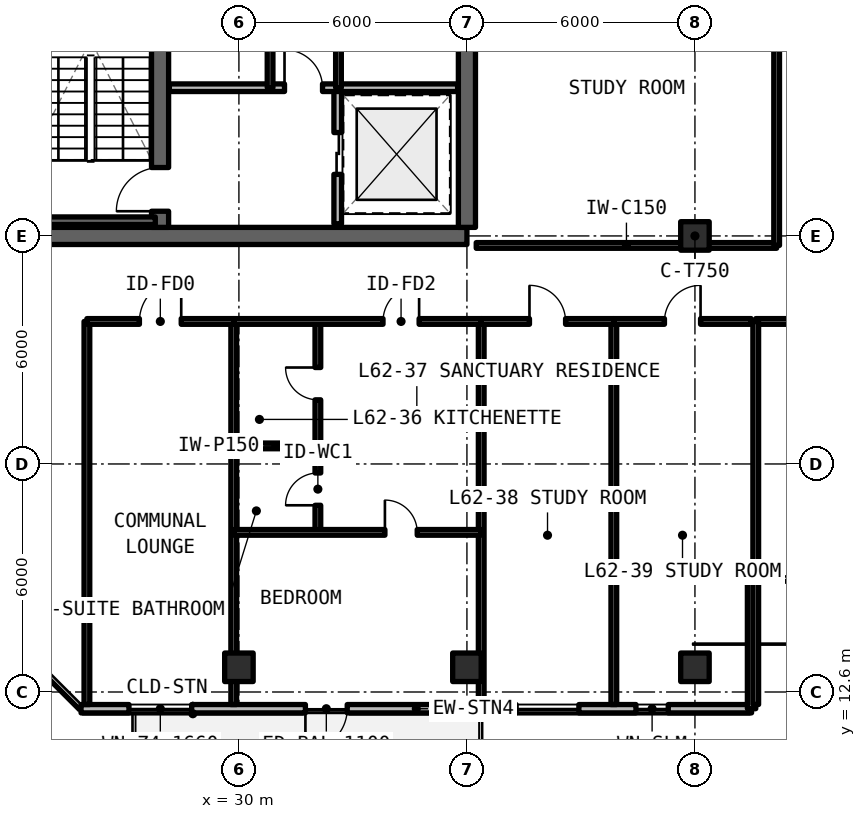
"""IFC4 building model, lengths in metres.
Left out: names, types, materials, properties, quantities, classifications, styles, units other than length and angle.
Written with IfcOpenShell. Run it as: python <this file> out.ifc"""

import sys

from ifc_helpers import new_model, si_unit, direction, frame, frame_2d, origin, origin_2d, place, context, subcontext, project, spatial, rectangle, extrude, element, fill, save


model = new_model("IFC4")
c1 = context("Model", 3, precision=1e-05, world=origin(), true_north=direction((0.0, 1.0)))
c2 = subcontext(c1, "Body", "Model", "MODEL_VIEW")
j1 = project(units=[si_unit("LENGTHUNIT", "METRE"), si_unit("PLANEANGLEUNIT", "RADIAN")], contexts=[c1])
p1 = place(None, origin())
s1 = spatial("IfcSite", under=j1, at=p1, CompositionType="ELEMENT")
p2 = place(p1, origin())
s2 = spatial("IfcBuilding", under=s1, at=p2, CompositionType="ELEMENT")
p3 = place(p2, frame((0.0, 0.0, 222.75)))
s3 = spatial("IfcBuildingStorey", under=s2, at=p3, CompositionType="ELEMENT", Elevation=222.75)
p4 = place(p3, frame((24.0, 24.6, 0.0), z_axis=(0.0, 0.0, 1.0), x_axis=(1.0, 0.0, 0.0)))
e1 = element("IfcWall", 1, at=p4, inside=s3, PredefinedType="SHEAR", context=c2, shape_type="SweptSolid", body=[
    extrude(rectangle(XDim=12.0, YDim=0.45, at=frame_2d((6.0, 0.0))), origin(), (0.0, 0.0, 1.0), 3.3),
])
p5 = place(p3, frame((36.0, 24.825, 0.0), z_axis=(0.0, 0.0, 1.0), x_axis=(0.0, 1.0, 0.0)))
e2 = element("IfcWall", 2, at=p5, inside=s3, PredefinedType="SHEAR", context=c2, shape_type="SweptSolid", body=[
    extrude(rectangle(XDim=8.975, YDim=0.45, at=frame_2d((4.488, 0.0))), origin(), (0.0, 0.0, 1.0), 3.3),
])
p6 = place(p3, frame((27.925, 24.825, 0.0), z_axis=(0.0, 0.0, 1.0), x_axis=(0.0, 1.0, 0.0)))
e3 = element("IfcWall", 3, at=p6, inside=s3, PredefinedType="SHEAR", context=c2, shape_type="SweptSolid", body=[
    extrude(rectangle(XDim=17.55, YDim=0.45, at=frame_2d((8.775, 0.0))), origin(), (0.0, 0.0, 1.0), 3.3),
])
p7 = place(p6, frame((0.425, 0.0, 0.0)))
e4 = element("IfcOpeningElement", 4, at=p7, cuts=e3, PredefinedType="OPENING", context=c2, shape_type="SweptSolid", body=[
    extrude(rectangle(XDim=1.15, YDim=2.15, at=frame_2d((0.575, 1.075))), frame((0.0, 0.235, 0.0), z_axis=(0.0, -1.0, 0.0), x_axis=(1.0, 0.0, 0.0)), (0.0, 0.0, 1.0), 0.47),
])
p8 = place(p6, frame((9.625, 0.0, 0.0)))
e5 = element("IfcOpeningElement", 5, at=p8, cuts=e3, PredefinedType="OPENING", context=c2, shape_type="SweptSolid", body=[
    extrude(rectangle(XDim=1.15, YDim=2.15, at=frame_2d((0.575, 1.075))), frame((0.0, 0.235, 0.0), z_axis=(0.0, -1.0, 0.0), x_axis=(1.0, 0.0, 0.0)), (0.0, 0.0, 1.0), 0.47),
])
for number, where, z_axis, x_axis in (
    (6, (42.0, 24.6, 0.0), (0.0, 0.0, 1.0), (1.0, 0.0, 0.0)),
    (7, (30.0, 13.25, 0.0), (0.0, 0.0, 1.0), (1.0, 0.0, 0.0)),
    (8, (36.0, 13.25, 0.0), (0.0, 0.0, 1.0), (1.0, 0.0, 0.0)),
    (9, (42.0, 13.25, 0.0), (0.0, 0.0, 1.0), (1.0, 0.0, 0.0)),
):
    element("IfcColumn", number, at=place(p3, frame(where, z_axis=z_axis, x_axis=x_axis)), inside=s3, PredefinedType="COLUMN", context=c2, shape_type="SweptSolid", body=[
        extrude(rectangle(XDim=0.75, YDim=0.75, at=origin_2d()), origin(), (0.0, 0.0, 1.0), 3.3),
    ])
p9 = place(p3, frame((25.846, 12.16, 0.0), z_axis=(0.0, 0.0, 1.0), x_axis=(1.0, 0.0, 0.0)))
e10 = element("IfcWall", 10, at=p9, inside=s3, PredefinedType="SOLIDWALL", context=c2, shape_type="SweptSolid", body=[
    extrude(rectangle(XDim=17.644, YDim=0.22, at=frame_2d((8.822, 0.0))), origin(), (0.0, 0.0, 1.0), 3.08),
])
p10 = place(p9, frame((5.904, 0.0, 0.0)))
e11 = element("IfcOpeningElement", 11, at=p10, cuts=e10, PredefinedType="OPENING", context=c2, shape_type="SweptSolid", body=[
    extrude(rectangle(XDim=1.1, YDim=2.15, at=frame_2d((0.55, 1.075))), frame((0.0, 0.12, 0.0), z_axis=(0.0, -1.0, 0.0), x_axis=(1.0, 0.0, 0.0)), (0.0, 0.0, 1.0), 0.24),
])
p11 = place(p9, frame((1.261, 0.0, 0.78)))
e12 = element("IfcOpeningElement", 12, at=p11, cuts=e10, PredefinedType="OPENING", context=c2, shape_type="SweptSolid", body=[
    extrude(rectangle(XDim=1.65, YDim=1.66, at=frame_2d((0.825, 0.83))), frame((0.0, 0.12, 0.0), z_axis=(0.0, -1.0, 0.0), x_axis=(1.0, 0.0, 0.0)), (0.0, 0.0, 1.0), 0.24),
])
p12 = place(p9, frame((11.45, 0.0, 0.78)))
e13 = element("IfcOpeningElement", 13, at=p12, cuts=e10, PredefinedType="OPENING", context=c2, shape_type="SweptSolid", body=[
    extrude(rectangle(XDim=1.65, YDim=1.66, at=frame_2d((0.825, 0.83))), frame((0.0, 0.12, 0.0), z_axis=(0.0, -1.0, 0.0), x_axis=(1.0, 0.0, 0.0)), (0.0, 0.0, 1.0), 0.24),
])
p13 = place(p9, frame((14.602, 0.0, 0.78)))
e14 = element("IfcOpeningElement", 14, at=p13, cuts=e10, PredefinedType="OPENING", context=c2, shape_type="SweptSolid", body=[
    extrude(rectangle(XDim=0.85, YDim=1.65, at=frame_2d((0.425, 0.825))), frame((0.0, 0.12, 0.0), z_axis=(0.0, -1.0, 0.0), x_axis=(1.0, 0.0, 0.0)), (0.0, 0.0, 1.0), 0.24),
])
p14 = place(p3, frame((43.49, 12.16, 0.0), z_axis=(0.0, 0.0, 1.0), x_axis=(0.0, 1.0, 0.0)))
e15 = element("IfcWall", 15, at=p14, inside=s3, PredefinedType="SOLIDWALL", context=c2, shape_type="SweptSolid", body=[
    extrude(rectangle(XDim=3.4, YDim=0.22, at=frame_2d((1.7, 0.0))), origin(), (0.0, 0.0, 1.0), 3.08),
])
p15 = place(p3, frame((32.6, 24.92, 0.0), z_axis=(0.0, 0.0, 1.0), x_axis=(0.0, 1.0, 0.0)))
e16 = element("IfcWall", 16, at=p15, inside=s3, PredefinedType="SOLIDWALL", context=c2, shape_type="SweptSolid", body=[
    extrude(rectangle(XDim=3.58, YDim=0.2, at=frame_2d((1.79, 0.0))), origin(), (0.0, 0.0, 1.0), 2.35),
])
p16 = place(p15, frame((1.3, 0.0, 0.0)))
e17 = element("IfcOpeningElement", 17, at=p16, cuts=e16, PredefinedType="OPENING", context=c2, shape_type="SweptSolid", body=[
    extrude(rectangle(XDim=1.1, YDim=2.2, at=frame_2d((0.55, 1.1))), frame((0.0, 0.11, 0.0), z_axis=(0.0, -1.0, 0.0), x_axis=(1.0, 0.0, 0.0)), (0.0, 0.0, 1.0), 0.22),
])
p17 = place(p3, frame((28.17, 28.5, 0.0), z_axis=(0.0, 0.0, 1.0), x_axis=(1.0, 0.0, 0.0)))
e18 = element("IfcWall", 18, at=p17, inside=s3, PredefinedType="SOLIDWALL", context=c2, shape_type="SweptSolid", body=[
    extrude(rectangle(XDim=7.585, YDim=0.2, at=frame_2d((3.792, 0.0))), origin(), (0.0, 0.0, 1.0), 2.35),
])
p18 = place(p17, frame((3.03, 0.0, 0.0)))
e19 = element("IfcOpeningElement", 19, at=p18, cuts=e18, PredefinedType="OPENING", context=c2, shape_type="SweptSolid", body=[
    extrude(rectangle(XDim=1.0, YDim=2.15, at=frame_2d((0.5, 1.075))), frame((0.0, 0.11, 0.0), z_axis=(0.0, -1.0, 0.0), x_axis=(1.0, 0.0, 0.0)), (0.0, 0.0, 1.0), 0.22),
])
p19 = place(p3, frame((30.82, 28.5, 0.0), z_axis=(0.0, 0.0, 1.0), x_axis=(0.0, 1.0, 0.0)))
e20 = element("IfcWall", 20, at=p19, inside=s3, PredefinedType="SOLIDWALL", context=c2, shape_type="SweptSolid", body=[
    extrude(rectangle(XDim=5.22, YDim=0.15, at=frame_2d((2.61, 0.0))), origin(), (0.0, 0.0, 1.0), 2.35),
])
p20 = place(p19, frame((2.1, 0.0, 0.0)))
e21 = element("IfcOpeningElement", 21, at=p20, cuts=e20, PredefinedType="OPENING", context=c2, shape_type="SweptSolid", body=[
    extrude(rectangle(XDim=0.95, YDim=2.15, at=frame_2d((0.475, 1.075))), frame((0.0, 0.085, 0.0), z_axis=(0.0, -1.0, 0.0), x_axis=(1.0, 0.0, 0.0)), (0.0, 0.0, 1.0), 0.17),
])
p21 = place(p3, frame((32.62, 28.5, 0.0), z_axis=(0.0, 0.0, 1.0), x_axis=(0.0, 1.0, 0.0)))
e22 = element("IfcWall", 22, at=p21, inside=s3, PredefinedType="SOLIDWALL", context=c2, shape_type="SweptSolid", body=[
    extrude(rectangle(XDim=5.22, YDim=0.15, at=frame_2d((2.61, 0.0))), origin(), (0.0, 0.0, 1.0), 2.35),
])
p22 = place(p21, frame((2.0, 0.0, 0.0)))
e23 = element("IfcOpeningElement", 23, at=p22, cuts=e22, PredefinedType="OPENING", context=c2, shape_type="SweptSolid", body=[
    extrude(rectangle(XDim=0.95, YDim=2.15, at=frame_2d((0.475, 1.075))), frame((0.0, 0.085, 0.0), z_axis=(0.0, -1.0, 0.0), x_axis=(1.0, 0.0, 0.0)), (0.0, 0.0, 1.0), 0.17),
])
p23 = place(p3, frame((36.245, 24.35, 0.0), z_axis=(0.0, 0.0, 1.0), x_axis=(1.0, 0.0, 0.0)))
e24 = element("IfcWall", 24, at=p23, inside=s3, PredefinedType="SOLIDWALL", context=c2, shape_type="SweptSolid", body=[
    extrude(rectangle(XDim=7.905, YDim=0.15, at=frame_2d((3.952, 0.0))), origin(), (0.0, 0.0, 1.0), 2.35),
])
p24 = place(p3, frame((44.15, 24.35, 0.0), z_axis=(0.0, 0.0, 1.0), x_axis=(0.0, 1.0, 0.0)))
e25 = element("IfcWall", 25, at=p24, inside=s3, PredefinedType="SOLIDWALL", context=c2, shape_type="SweptSolid", body=[
    extrude(rectangle(XDim=9.4, YDim=0.15, at=frame_2d((4.7, 0.0))), origin(), (0.0, 0.0, 1.0), 2.35),
])
p25 = place(p3, frame((43.6, 22.35, 0.0), z_axis=(0.0, 0.0, 1.0), x_axis=(1.0, 0.0, 0.0)))
e26 = element("IfcWall", 26, at=p25, inside=s3, PredefinedType="SOLIDWALL", context=c2, shape_type="SweptSolid", body=[
    extrude(rectangle(XDim=8.4, YDim=0.15, at=frame_2d((4.2, 0.0))), origin(), (0.0, 0.0, 1.0), 2.35),
])
p26 = place(p25, frame((3.65, 0.0, 0.0)))
e27 = element("IfcOpeningElement", 27, at=p26, cuts=e26, PredefinedType="OPENING", context=c2, shape_type="SweptSolid", body=[
    extrude(rectangle(XDim=1.1, YDim=2.15, at=frame_2d((0.55, 1.075))), frame((0.0, 0.085, 0.0), z_axis=(0.0, -1.0, 0.0), x_axis=(1.0, 0.0, 0.0)), (0.0, 0.0, 1.0), 0.17),
])
for number, where, z_axis, x_axis in (
    (28, (43.6, 12.27, 0.0), (0.0, 0.0, 1.0), (0.0, 1.0, 0.0)),
    (29, (26.0, 12.27, 0.0), (0.0, 0.0, 1.0), (0.0, 1.0, 0.0)),
    (30, (29.864, 12.27, 0.0), (0.0, 0.0, 1.0), (0.0, 1.0, 0.0)),
):
    element("IfcWall", number, at=place(p3, frame(where, z_axis=z_axis, x_axis=x_axis)), inside=s3, PredefinedType="SOLIDWALL", context=c2, shape_type="SweptSolid", body=[
        extrude(rectangle(XDim=10.08, YDim=0.15, at=frame_2d((5.04, 0.0))), origin(), (0.0, 0.0, 1.0), 2.35),
    ])
p27 = place(p3, frame((26.0, 22.35, 0.0), z_axis=(0.0, 0.0, 1.0), x_axis=(1.0, 0.0, 0.0)))
e31 = element("IfcWall", 31, at=p27, inside=s3, PredefinedType="SOLIDWALL", context=c2, shape_type="SweptSolid", body=[
    extrude(rectangle(XDim=3.864, YDim=0.15, at=frame_2d((1.932, 0.0))), origin(), (0.0, 0.0, 1.0), 2.35),
])
p28 = place(p27, frame((1.382, 0.0, 0.0)))
e32 = element("IfcOpeningElement", 32, at=p28, cuts=e31, PredefinedType="OPENING", context=c2, shape_type="SweptSolid", body=[
    extrude(rectangle(XDim=1.1, YDim=2.15, at=frame_2d((0.55, 1.075))), frame((0.0, 0.085, 0.0), z_axis=(0.0, -1.0, 0.0), x_axis=(1.0, 0.0, 0.0)), (0.0, 0.0, 1.0), 0.17),
])
p29 = place(p3, frame((36.376, 12.27, 0.0), z_axis=(0.0, 0.0, 1.0), x_axis=(0.0, 1.0, 0.0)))
e33 = element("IfcWall", 33, at=p29, inside=s3, PredefinedType="SOLIDWALL", context=c2, shape_type="SweptSolid", body=[
    extrude(rectangle(XDim=10.08, YDim=0.15, at=frame_2d((5.04, 0.0))), origin(), (0.0, 0.0, 1.0), 2.35),
])
p30 = place(p3, frame((29.864, 19.075, 0.0), z_axis=(0.0, 0.0, 1.0), x_axis=(1.0, 0.0, 0.0)))
e34 = element("IfcWall", 34, at=p30, inside=s3, PredefinedType="PARTITIONING", context=c2, shape_type="SweptSolid", body=[
    extrude(rectangle(XDim=2.214, YDim=0.15, at=frame_2d((1.107, 0.0))), origin(), (0.0, 0.0, 1.0), 2.35),
])
p31 = place(p3, frame((32.078, 16.8, 0.0), z_axis=(0.0, 0.0, 1.0), x_axis=(0.0, 1.0, 0.0)))
e35 = element("IfcWall", 35, at=p31, inside=s3, PredefinedType="PARTITIONING", context=c2, shape_type="SweptSolid", body=[
    extrude(rectangle(XDim=5.55, YDim=0.15, at=frame_2d((2.775, 0.0))), origin(), (0.0, 0.0, 1.0), 2.35),
])
p32 = place(p31, frame((0.713, 0.0, 0.0)))
e36 = element("IfcOpeningElement", 36, at=p32, cuts=e35, PredefinedType="OPENING", context=c2, shape_type="SweptSolid", body=[
    extrude(rectangle(XDim=0.85, YDim=2.1, at=frame_2d((0.425, 1.05))), frame((0.0, 0.085, 0.0), z_axis=(0.0, -1.0, 0.0), x_axis=(1.0, 0.0, 0.0)), (0.0, 0.0, 1.0), 0.17),
])
p33 = place(p31, frame((3.488, 0.0, 0.0)))
e37 = element("IfcOpeningElement", 37, at=p33, cuts=e35, PredefinedType="OPENING", context=c2, shape_type="SweptSolid", body=[
    extrude(rectangle(XDim=0.85, YDim=2.1, at=frame_2d((0.425, 1.05))), frame((0.0, 0.085, 0.0), z_axis=(0.0, -1.0, 0.0), x_axis=(1.0, 0.0, 0.0)), (0.0, 0.0, 1.0), 0.17),
])
p34 = place(p3, frame((29.864, 16.8, 0.0), z_axis=(0.0, 0.0, 1.0), x_axis=(1.0, 0.0, 0.0)))
e38 = element("IfcWall", 38, at=p34, inside=s3, PredefinedType="PARTITIONING", context=c2, shape_type="SweptSolid", body=[
    extrude(rectangle(XDim=6.512, YDim=0.15, at=frame_2d((3.256, 0.0))), origin(), (0.0, 0.0, 1.0), 2.35),
])
p35 = place(p34, frame((3.978, 0.0, 0.0)))
e39 = element("IfcOpeningElement", 39, at=p35, cuts=e38, PredefinedType="OPENING", context=c2, shape_type="SweptSolid", body=[
    extrude(rectangle(XDim=0.85, YDim=2.1, at=frame_2d((0.425, 1.05))), frame((0.0, 0.085, 0.0), z_axis=(0.0, -1.0, 0.0), x_axis=(1.0, 0.0, 0.0)), (0.0, 0.0, 1.0), 0.17),
])
p36 = place(p3, frame((29.864, 22.35, 0.0), z_axis=(0.0, 0.0, 1.0), x_axis=(1.0, 0.0, 0.0)))
e40 = element("IfcWall", 40, at=p36, inside=s3, PredefinedType="SOLIDWALL", context=c2, shape_type="SweptSolid", body=[
    extrude(rectangle(XDim=6.512, YDim=0.15, at=frame_2d((3.256, 0.0))), origin(), (0.0, 0.0, 1.0), 2.35),
])
p37 = place(p36, frame((3.928, 0.0, 0.0)))
e41 = element("IfcOpeningElement", 41, at=p37, cuts=e40, PredefinedType="OPENING", context=c2, shape_type="SweptSolid", body=[
    extrude(rectangle(XDim=0.95, YDim=2.15, at=frame_2d((0.475, 1.075))), frame((0.0, 0.085, 0.0), z_axis=(0.0, -1.0, 0.0), x_axis=(1.0, 0.0, 0.0)), (0.0, 0.0, 1.0), 0.17),
])
p38 = place(p3, frame((39.866, 12.27, 0.0), z_axis=(0.0, 0.0, 1.0), x_axis=(0.0, 1.0, 0.0)))
e42 = element("IfcWall", 42, at=p38, inside=s3, PredefinedType="SOLIDWALL", context=c2, shape_type="SweptSolid", body=[
    extrude(rectangle(XDim=10.08, YDim=0.15, at=frame_2d((5.04, 0.0))), origin(), (0.0, 0.0, 1.0), 2.35),
])
p39 = place(p3, frame((36.376, 22.35, 0.0), z_axis=(0.0, 0.0, 1.0), x_axis=(1.0, 0.0, 0.0)))
e43 = element("IfcWall", 43, at=p39, inside=s3, PredefinedType="SOLIDWALL", context=c2, shape_type="SweptSolid", body=[
    extrude(rectangle(XDim=3.49, YDim=0.15, at=frame_2d((1.745, 0.0))), origin(), (0.0, 0.0, 1.0), 2.35),
])
p40 = place(p39, frame((1.27, 0.0, 0.0)))
e44 = element("IfcOpeningElement", 44, at=p40, cuts=e43, PredefinedType="OPENING", context=c2, shape_type="SweptSolid", body=[
    extrude(rectangle(XDim=0.95, YDim=2.15, at=frame_2d((0.475, 1.075))), frame((0.0, 0.085, 0.0), z_axis=(0.0, -1.0, 0.0), x_axis=(1.0, 0.0, 0.0)), (0.0, 0.0, 1.0), 0.17),
])
p41 = place(p3, frame((39.866, 22.35, 0.0), z_axis=(0.0, 0.0, 1.0), x_axis=(1.0, 0.0, 0.0)))
e45 = element("IfcWall", 45, at=p41, inside=s3, PredefinedType="SOLIDWALL", context=c2, shape_type="SweptSolid", body=[
    extrude(rectangle(XDim=3.614, YDim=0.15, at=frame_2d((1.807, 0.0))), origin(), (0.0, 0.0, 1.0), 2.35),
])
p42 = place(p41, frame((1.332, 0.0, 0.0)))
e46 = element("IfcOpeningElement", 46, at=p42, cuts=e45, PredefinedType="OPENING", context=c2, shape_type="SweptSolid", body=[
    extrude(rectangle(XDim=0.95, YDim=2.15, at=frame_2d((0.475, 1.075))), frame((0.0, 0.085, 0.0), z_axis=(0.0, -1.0, 0.0), x_axis=(1.0, 0.0, 0.0)), (0.0, 0.0, 1.0), 0.17),
])
p43 = place(p3, frame((24.4, 25.0, 0.0), z_axis=(0.0, 0.0, 1.0), x_axis=(1.0, 0.0, 0.0)))
e47 = element("IfcWall", 47, at=p43, inside=s3, PredefinedType="SOLIDWALL", context=c2, shape_type="SweptSolid", body=[
    extrude(rectangle(XDim=3.4, YDim=0.2, at=frame_2d((1.7, 0.0))), origin(), (0.0, 0.0, 1.0), 3.3),
])
p44 = place(p10, frame((1.1, 0.0, 0.0), z_axis=(0.0, 0.0, 1.0), x_axis=(-1.0, 0.0, 0.0)))
e48 = element("IfcDoor", 48, at=p44, inside=s3, OperationType="SINGLE_SWING_LEFT", PredefinedType="DOOR", context=c2, shape_type="SweptSolid", body=[
    extrude(rectangle(XDim=1.1, YDim=2.15, at=frame_2d((0.55, 1.075))), frame((0.0, 0.025, 0.0), z_axis=(0.0, -1.0, 0.0), x_axis=(1.0, 0.0, 0.0)), (0.0, 0.0, 1.0), 0.05),
])
fill(e11, e48)
p45 = place(p11, origin())
e49 = element("IfcWindow", 49, at=p45, inside=s3, PartitioningType="SINGLE_PANEL", PredefinedType="WINDOW", context=c2, shape_type="SweptSolid", body=[
    extrude(rectangle(XDim=1.65, YDim=1.66, at=frame_2d((0.825, 0.83))), frame((0.0, 0.03, 0.0), z_axis=(0.0, -1.0, 0.0), x_axis=(1.0, 0.0, 0.0)), (0.0, 0.0, 1.0), 0.06),
])
fill(e12, e49)
p46 = place(p12, origin())
e50 = element("IfcWindow", 50, at=p46, inside=s3, PartitioningType="SINGLE_PANEL", PredefinedType="WINDOW", context=c2, shape_type="SweptSolid", body=[
    extrude(rectangle(XDim=1.65, YDim=1.66, at=frame_2d((0.825, 0.83))), frame((0.0, 0.03, 0.0), z_axis=(0.0, -1.0, 0.0), x_axis=(1.0, 0.0, 0.0)), (0.0, 0.0, 1.0), 0.06),
])
fill(e13, e50)
p47 = place(p13, origin())
e51 = element("IfcWindow", 51, at=p47, inside=s3, PartitioningType="SINGLE_PANEL", PredefinedType="WINDOW", context=c2, shape_type="SweptSolid", body=[
    extrude(rectangle(XDim=0.85, YDim=1.65, at=frame_2d((0.425, 0.825))), frame((0.0, 0.03, 0.0), z_axis=(0.0, -1.0, 0.0), x_axis=(1.0, 0.0, 0.0)), (0.0, 0.0, 1.0), 0.06),
])
fill(e14, e51)
p48 = place(p16, origin())
e52 = element("IfcDoor", 52, at=p48, inside=s3, OperationType="SLIDING_TO_LEFT", PredefinedType="DOOR", context=c2, shape_type="SweptSolid", body=[
    extrude(rectangle(XDim=1.1, YDim=2.2, at=frame_2d((0.55, 1.1))), frame((0.0, 0.025, 0.0), z_axis=(0.0, -1.0, 0.0), x_axis=(1.0, 0.0, 0.0)), (0.0, 0.0, 1.0), 0.05),
])
fill(e17, e52)
p49 = place(p18, origin())
e53 = element("IfcDoor", 53, at=p49, inside=s3, OperationType="SINGLE_SWING_LEFT", PredefinedType="DOOR", context=c2, shape_type="SweptSolid", body=[
    extrude(rectangle(XDim=1.0, YDim=2.15, at=frame_2d((0.5, 1.075))), frame((0.0, 0.025, 0.0), z_axis=(0.0, -1.0, 0.0), x_axis=(1.0, 0.0, 0.0)), (0.0, 0.0, 1.0), 0.05),
])
fill(e19, e53)
p50 = place(p28, origin())
e54 = element("IfcDoor", 54, at=p50, inside=s3, OperationType="SINGLE_SWING_RIGHT", PredefinedType="DOOR", context=c2, shape_type="SweptSolid", body=[
    extrude(rectangle(XDim=1.1, YDim=2.15, at=frame_2d((0.55, 1.075))), frame((0.0, 0.025, 0.0), z_axis=(0.0, -1.0, 0.0), x_axis=(1.0, 0.0, 0.0)), (0.0, 0.0, 1.0), 0.05),
])
fill(e32, e54)
p51 = place(p32, origin())
e55 = element("IfcDoor", 55, at=p51, inside=s3, OperationType="SINGLE_SWING_LEFT", PredefinedType="DOOR", context=c2, shape_type="SweptSolid", body=[
    extrude(rectangle(XDim=0.85, YDim=2.1, at=frame_2d((0.425, 1.05))), frame((0.0, 0.025, 0.0), z_axis=(0.0, -1.0, 0.0), x_axis=(1.0, 0.0, 0.0)), (0.0, 0.0, 1.0), 0.05),
])
fill(e36, e55)
p52 = place(p33, origin())
e56 = element("IfcDoor", 56, at=p52, inside=s3, OperationType="SINGLE_SWING_RIGHT", PredefinedType="DOOR", context=c2, shape_type="SweptSolid", body=[
    extrude(rectangle(XDim=0.85, YDim=2.1, at=frame_2d((0.425, 1.05))), frame((0.0, 0.025, 0.0), z_axis=(0.0, -1.0, 0.0), x_axis=(1.0, 0.0, 0.0)), (0.0, 0.0, 1.0), 0.05),
])
fill(e37, e56)
p53 = place(p35, origin())
e57 = element("IfcDoor", 57, at=p53, inside=s3, OperationType="SINGLE_SWING_LEFT", PredefinedType="DOOR", context=c2, shape_type="SweptSolid", body=[
    extrude(rectangle(XDim=0.85, YDim=2.1, at=frame_2d((0.425, 1.05))), frame((0.0, 0.025, 0.0), z_axis=(0.0, -1.0, 0.0), x_axis=(1.0, 0.0, 0.0)), (0.0, 0.0, 1.0), 0.05),
])
fill(e39, e57)
p54 = place(p37, origin())
e58 = element("IfcDoor", 58, at=p54, inside=s3, OperationType="SINGLE_SWING_RIGHT", PredefinedType="DOOR", context=c2, shape_type="SweptSolid", body=[
    extrude(rectangle(XDim=0.95, YDim=2.15, at=frame_2d((0.475, 1.075))), frame((0.0, 0.025, 0.0), z_axis=(0.0, -1.0, 0.0), x_axis=(1.0, 0.0, 0.0)), (0.0, 0.0, 1.0), 0.05),
])
fill(e41, e58)
p55 = place(p40, origin())
e59 = element("IfcDoor", 59, at=p55, inside=s3, OperationType="SINGLE_SWING_LEFT", PredefinedType="DOOR", context=c2, shape_type="SweptSolid", body=[
    extrude(rectangle(XDim=0.95, YDim=2.15, at=frame_2d((0.475, 1.075))), frame((0.0, 0.025, 0.0), z_axis=(0.0, -1.0, 0.0), x_axis=(1.0, 0.0, 0.0)), (0.0, 0.0, 1.0), 0.05),
])
fill(e44, e59)
p56 = place(p42, origin())
e60 = element("IfcDoor", 60, at=p56, inside=s3, OperationType="SINGLE_SWING_RIGHT", PredefinedType="DOOR", context=c2, shape_type="SweptSolid", body=[
    extrude(rectangle(XDim=0.95, YDim=2.15, at=frame_2d((0.475, 1.075))), frame((0.0, 0.025, 0.0), z_axis=(0.0, -1.0, 0.0), x_axis=(1.0, 0.0, 0.0)), (0.0, 0.0, 1.0), 0.05),
])
fill(e46, e60)
p57 = place(p7, origin())
e61 = element("IfcDoor", 61, at=p57, inside=s3, OperationType="SINGLE_SWING_RIGHT", PredefinedType="DOOR", context=c2, shape_type="SweptSolid", body=[
    extrude(rectangle(XDim=1.15, YDim=2.15, at=frame_2d((0.575, 1.075))), frame((0.0, 0.025, 0.0), z_axis=(0.0, -1.0, 0.0), x_axis=(1.0, 0.0, 0.0)), (0.0, 0.0, 1.0), 0.05),
])
fill(e4, e61)
save(model, sys.argv[1])
